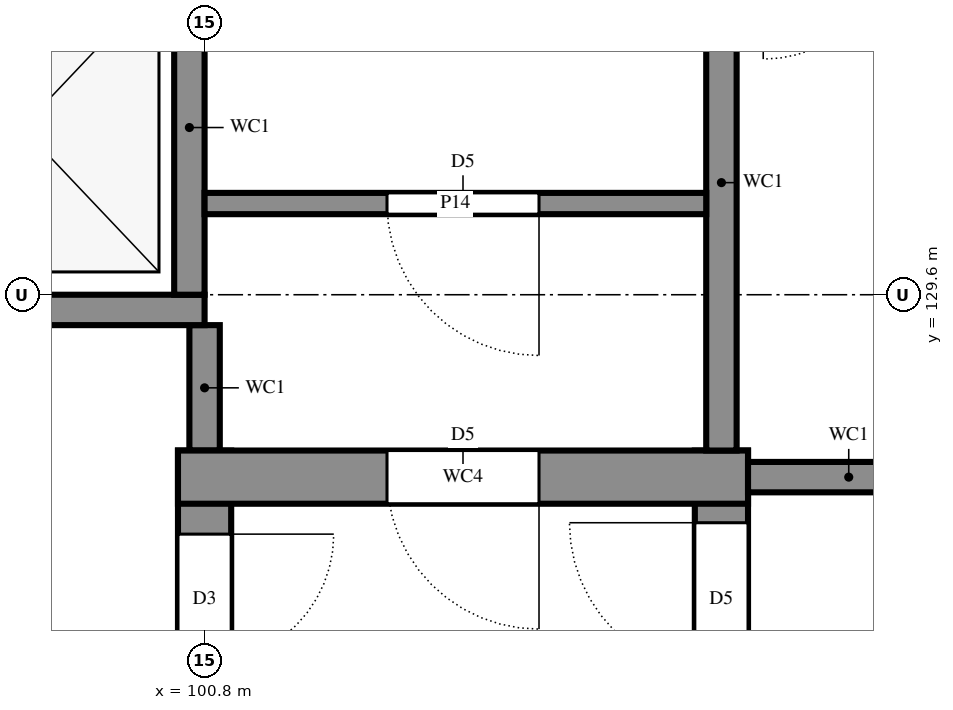
"""IFC4 building model, lengths in metres.
Left out: names, types, materials, properties, quantities, classifications, styles, units other than length and angle.
Written with IfcOpenShell. Run it as: python <this file> out.ifc"""

import sys

from ifc_helpers import new_model, si_unit, direction, frame, frame_2d, origin, place, context, subcontext, project, spatial, rectangle, extrude, element, fill, save


model = new_model("IFC4")
c1 = context("Model", 3, precision=1e-05, world=origin(), true_north=direction((0.0, 1.0)))
c2 = subcontext(c1, "Body", "Model", "MODEL_VIEW")
j1 = project(units=[si_unit("LENGTHUNIT", "METRE"), si_unit("PLANEANGLEUNIT", "RADIAN")], contexts=[c1])
p1 = place(None, origin())
s1 = spatial("IfcSite", under=j1, at=p1, CompositionType="ELEMENT")
p2 = place(p1, origin())
s2 = spatial("IfcBuilding", under=s1, at=p2, CompositionType="ELEMENT")
p3 = place(p2, frame((0.0, 0.0, 7.2)))
s3 = spatial("IfcBuildingStorey", under=s2, at=p3, CompositionType="ELEMENT", Elevation=7.2)
p4 = place(p3, frame((104.2, 125.1, 0.0), z_axis=(0.0, 0.0, 1.0), x_axis=(0.0, 1.0, 0.0)))
e1 = element("IfcWall", 1, at=p4, inside=s3, PredefinedType="SHEAR", context=c2, shape_type="SweptSolid", body=[
    extrude(rectangle(XDim=3.475, YDim=0.35, at=frame_2d((1.737, 0.0))), origin(), (0.0, 0.0, 1.0), 3.6),
])
p5 = place(p4, frame((2.0, 0.0, 0.0)))
e2 = element("IfcOpeningElement", 2, at=p5, cuts=e1, PredefinedType="OPENING", context=c2, shape_type="SweptSolid", body=[
    extrude(rectangle(XDim=1.0, YDim=2.1, at=frame_2d((0.5, 1.05))), frame((0.0, 0.185, 0.0), z_axis=(0.0, -1.0, 0.0), x_axis=(1.0, 0.0, 0.0)), (0.0, 0.0, 1.0), 0.37),
])
p6 = place(p3, frame((100.8, 128.575, 0.0), z_axis=(0.0, 0.0, 1.0), x_axis=(0.0, -1.0, 0.0)))
e3 = element("IfcWall", 3, at=p6, inside=s3, PredefinedType="SHEAR", context=c2, shape_type="SweptSolid", body=[
    extrude(rectangle(XDim=6.35, YDim=0.35, at=frame_2d((3.175, 0.0))), origin(), (0.0, 0.0, 1.0), 3.6),
])
p7 = place(p6, frame((0.55, 0.0, 0.0)))
e4 = element("IfcOpeningElement", 4, at=p7, cuts=e3, PredefinedType="OPENING", context=c2, shape_type="SweptSolid", body=[
    extrude(rectangle(XDim=0.85, YDim=2.1, at=frame_2d((0.425, 1.05))), frame((0.0, 0.185, 0.0), z_axis=(0.0, -1.0, 0.0), x_axis=(1.0, 0.0, 0.0)), (0.0, 0.0, 1.0), 0.37),
])
p8 = place(p3, frame((100.8, 128.575, 0.0), z_axis=(0.0, 0.0, 1.0), x_axis=(0.0, 1.0, 0.0)))
e5 = element("IfcWall", 5, at=p8, inside=s3, PredefinedType="SHEAR", context=c2, shape_type="SweptSolid", body=[
    extrude(rectangle(XDim=0.825, YDim=0.2, at=frame_2d((0.413, 0.0))), origin(), (0.0, 0.0, 1.0), 3.6),
])
p9 = place(p3, frame((104.375, 128.4, 0.0), z_axis=(0.0, 0.0, 1.0), x_axis=(-1.0, 0.0, 0.0)))
e6 = element("IfcWall", 6, at=p9, inside=s3, PredefinedType="SHEAR", context=c2, shape_type="SweptSolid", body=[
    extrude(rectangle(XDim=3.75, YDim=0.35, at=frame_2d((1.875, 0.0))), origin(), (0.0, 0.0, 1.0), 3.6),
])
p10 = place(p9, frame((1.375, 0.0, 0.0)))
e7 = element("IfcOpeningElement", 7, at=p10, cuts=e6, PredefinedType="OPENING", context=c2, shape_type="SweptSolid", body=[
    extrude(rectangle(XDim=1.0, YDim=2.1, at=frame_2d((0.5, 1.05))), frame((0.0, 0.185, 0.0), z_axis=(0.0, -1.0, 0.0), x_axis=(1.0, 0.0, 0.0)), (0.0, 0.0, 1.0), 0.37),
])
p11 = place(p3, frame((104.375, 128.4, 0.0), z_axis=(0.0, 0.0, 1.0), x_axis=(1.0, 0.0, 0.0)))
e8 = element("IfcWall", 8, at=p11, inside=s3, PredefinedType="SHEAR", context=c2, shape_type="SweptSolid", body=[
    extrude(rectangle(XDim=1.325, YDim=0.2, at=frame_2d((0.663, 0.0))), origin(), (0.0, 0.0, 1.0), 3.6),
])
p12 = place(p3, frame((104.2, 132.1, 0.0), z_axis=(0.0, 0.0, 1.0), x_axis=(0.0, -1.0, 0.0)))
e9 = element("IfcWall", 9, at=p12, inside=s3, PredefinedType="SHEAR", context=c2, shape_type="SweptSolid", body=[
    extrude(rectangle(XDim=3.525, YDim=0.2, at=frame_2d((1.763, 0.0))), origin(), (0.0, 0.0, 1.0), 3.6),
])
p13 = place(p3, frame((98.4, 129.5, 0.0), z_axis=(0.0, 0.0, 1.0), x_axis=(1.0, 0.0, 0.0)))
e10 = element("IfcWall", 10, at=p13, inside=s3, PredefinedType="SHEAR", context=c2, shape_type="SweptSolid", body=[
    extrude(rectangle(XDim=2.4, YDim=0.2, at=frame_2d((1.2, 0.0))), origin(), (0.0, 0.0, 1.0), 3.6),
])
p14 = place(p3, frame((100.7, 129.6, 0.0), z_axis=(0.0, 0.0, 1.0), x_axis=(0.0, 1.0, 0.0)))
e11 = element("IfcWall", 11, at=p14, inside=s3, PredefinedType="SHEAR", context=c2, shape_type="SweptSolid", body=[
    extrude(rectangle(XDim=2.2, YDim=0.2, at=frame_2d((1.1, 0.0))), origin(), (0.0, 0.0, 1.0), 3.6),
])
p15 = place(p3, frame((100.8, 130.2, 0.0), z_axis=(0.0, 0.0, 1.0), x_axis=(1.0, 0.0, 0.0)))
e12 = element("IfcWall", 12, at=p15, inside=s3, PredefinedType="PARTITIONING", context=c2, shape_type="SweptSolid", body=[
    extrude(rectangle(XDim=3.3, YDim=0.14, at=frame_2d((1.65, 0.0))), origin(), (0.0, 0.0, 1.0), 3.42),
])
p16 = place(p15, frame((1.2, 0.0, 0.0)))
e13 = element("IfcOpeningElement", 13, at=p16, cuts=e12, PredefinedType="OPENING", context=c2, shape_type="SweptSolid", body=[
    extrude(rectangle(XDim=1.0, YDim=2.1, at=frame_2d((0.5, 1.05))), frame((0.0, 0.08, 0.0), z_axis=(0.0, -1.0, 0.0), x_axis=(1.0, 0.0, 0.0)), (0.0, 0.0, 1.0), 0.16),
])
p17 = place(p16, frame((1.0, 0.0, 0.0), z_axis=(0.0, 0.0, 1.0), x_axis=(-1.0, 0.0, 0.0)))
e14 = element("IfcDoor", 14, at=p17, inside=s3, OperationType="SINGLE_SWING_RIGHT", PredefinedType="DOOR", context=c2, shape_type="SweptSolid", body=[
    extrude(rectangle(XDim=1.0, YDim=2.1, at=frame_2d((0.5, 1.05))), frame((0.0, 0.025, 0.0), z_axis=(0.0, -1.0, 0.0), x_axis=(1.0, 0.0, 0.0)), (0.0, 0.0, 1.0), 0.05),
])
fill(e13, e14)
p18 = place(p10, origin())
e15 = element("IfcDoor", 15, at=p18, inside=s3, OperationType="SINGLE_SWING_RIGHT", PredefinedType="DOOR", context=c2, shape_type="SweptSolid", body=[
    extrude(rectangle(XDim=1.0, YDim=2.1, at=frame_2d((0.5, 1.05))), frame((0.0, 0.025, 0.0), z_axis=(0.0, -1.0, 0.0), x_axis=(1.0, 0.0, 0.0)), (0.0, 0.0, 1.0), 0.05),
])
fill(e7, e15)
p19 = place(p7, origin())
e16 = element("IfcDoor", 16, at=p19, inside=s3, OperationType="SINGLE_SWING_RIGHT", PredefinedType="DOOR", context=c2, shape_type="SweptSolid", body=[
    extrude(rectangle(XDim=0.85, YDim=2.1, at=frame_2d((0.425, 1.05))), frame((0.0, 0.025, 0.0), z_axis=(0.0, -1.0, 0.0), x_axis=(1.0, 0.0, 0.0)), (0.0, 0.0, 1.0), 0.05),
])
fill(e4, e16)
p20 = place(p5, origin())
e17 = element("IfcDoor", 17, at=p20, inside=s3, OperationType="SINGLE_SWING_LEFT", PredefinedType="DOOR", context=c2, shape_type="SweptSolid", body=[
    extrude(rectangle(XDim=1.0, YDim=2.1, at=frame_2d((0.5, 1.05))), frame((0.0, 0.025, 0.0), z_axis=(0.0, -1.0, 0.0), x_axis=(1.0, 0.0, 0.0)), (0.0, 0.0, 1.0), 0.05),
])
fill(e2, e17)
save(model, sys.argv[1])
